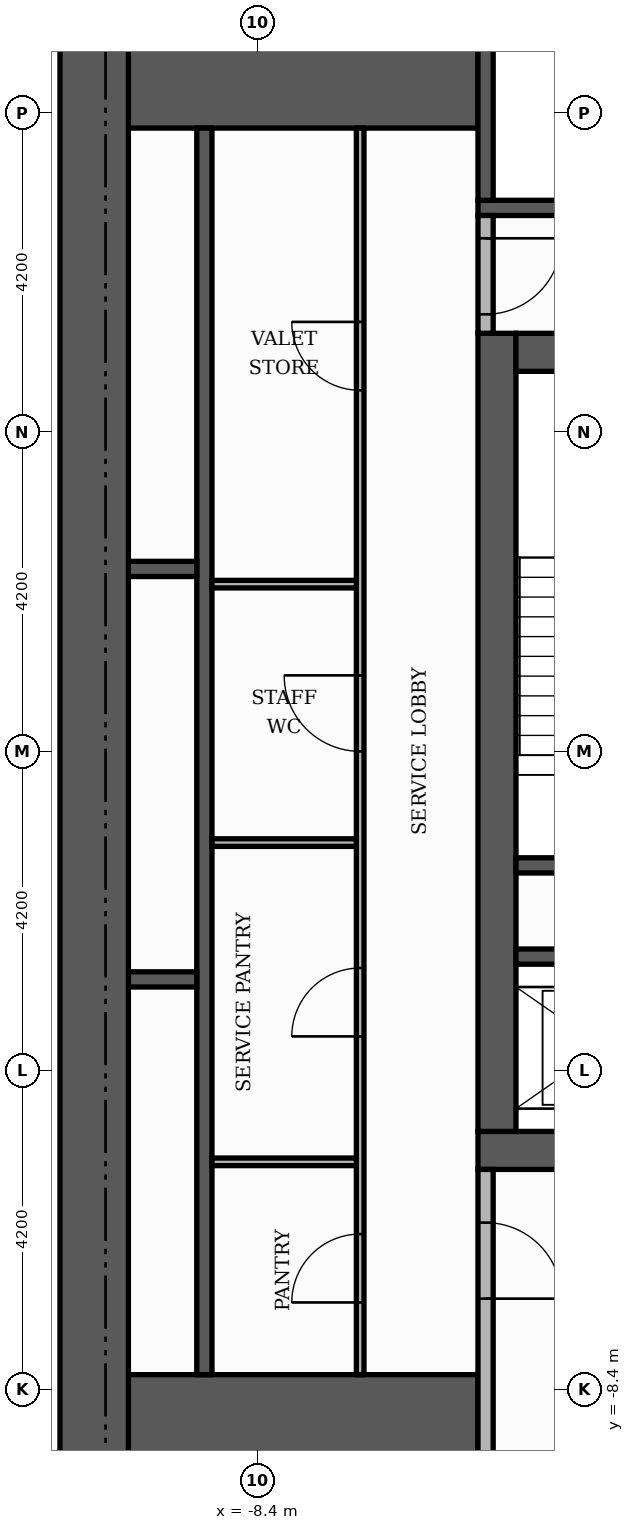
"""IFC4 building model, lengths in metres.
Left out: names, types, materials, properties, quantities, classifications, styles, units other than length and angle.
Written with IfcOpenShell. Run it as: python <this file> out.ifc"""

import sys

from ifc_helpers import new_model, si_unit, direction, frame, frame_2d, origin, place, context, subcontext, project, spatial, rectangle, extrude, element, fill, save


model = new_model("IFC4")
c1 = context("Model", 3, precision=1e-05, world=origin(), true_north=direction((0.0, 1.0)))
c2 = subcontext(c1, "Body", "Model", "MODEL_VIEW")
j1 = project(units=[si_unit("LENGTHUNIT", "METRE"), si_unit("PLANEANGLEUNIT", "RADIAN")], contexts=[c1])
p1 = place(None, origin())
s1 = spatial("IfcSite", under=j1, at=p1, CompositionType="ELEMENT")
p2 = place(p1, origin())
s2 = spatial("IfcBuilding", under=s1, at=p2, CompositionType="ELEMENT")
p3 = place(p2, frame((0.0, 0.0, 223.5)))
s3 = spatial("IfcBuildingStorey", under=s2, at=p3, CompositionType="ELEMENT", Elevation=223.5)
p4 = place(p3, frame((-5.5, -5.25, 0.0), z_axis=(0.0, 0.0, 1.0), x_axis=(1.0, 0.0, 0.0)))
e1 = element("IfcWall", 1, at=p4, inside=s3, PredefinedType="SHEAR", context=c2, shape_type="SweptSolid", body=[
    extrude(rectangle(XDim=11.0, YDim=0.5, at=frame_2d((5.5, 0.0))), origin(), (0.0, 0.0, 1.0), 3.48),
])
p5 = place(p4, frame((4.9, 0.0, 0.0)))
e2 = element("IfcOpeningElement", 2, at=p5, cuts=e1, PredefinedType="OPENING", context=c2, shape_type="SweptSolid", body=[
    extrude(rectangle(XDim=1.2, YDim=2.1, at=frame_2d((0.6, 1.05))), frame((0.0, 0.26, 0.0), z_axis=(0.0, -1.0, 0.0), x_axis=(1.0, 0.0, 0.0)), (0.0, 0.0, 1.0), 0.52),
])
p6 = place(p3, frame((-5.25, -5.0, 0.0), z_axis=(0.0, 0.0, 1.0), x_axis=(0.0, 1.0, 0.0)))
e3 = element("IfcWall", 3, at=p6, inside=s3, PredefinedType="SHEAR", context=c2, shape_type="SweptSolid", body=[
    extrude(rectangle(XDim=10.5, YDim=0.5, at=frame_2d((5.25, 0.0))), origin(), (0.0, 0.0, 1.0), 3.48),
])
p7 = place(p3, frame((-5.0, 5.25, 0.0), z_axis=(0.0, 0.0, 1.0), x_axis=(1.0, 0.0, 0.0)))
e4 = element("IfcWall", 4, at=p7, inside=s3, PredefinedType="SHEAR", context=c2, shape_type="SweptSolid", body=[
    extrude(rectangle(XDim=10.0, YDim=0.5, at=frame_2d((5.0, 0.0))), origin(), (0.0, 0.0, 1.0), 3.48),
])
p8 = place(p7, frame((4.4, 0.0, 0.0)))
e5 = element("IfcOpeningElement", 5, at=p8, cuts=e4, PredefinedType="OPENING", context=c2, shape_type="SweptSolid", body=[
    extrude(rectangle(XDim=1.2, YDim=2.1, at=frame_2d((0.6, 1.05))), frame((0.0, 0.26, 0.0), z_axis=(0.0, -1.0, 0.0), x_axis=(1.0, 0.0, 0.0)), (0.0, 0.0, 1.0), 0.52),
])
for number, where, z_axis, x_axis in (
    (6, (-10.1, -9.15, 0.0), (0.0, 0.0, 1.0), (1.0, 0.0, 0.0)),
    (7, (-10.1, 9.15, 0.0), (0.0, 0.0, 1.0), (1.0, 0.0, 0.0)),
):
    element("IfcWall", number, at=place(p3, frame(where, z_axis=z_axis, x_axis=x_axis)), inside=s3, PredefinedType="SHEAR", context=c2, shape_type="SweptSolid", body=[
        extrude(rectangle(XDim=4.6, YDim=1.9, at=frame_2d((2.3, 0.0))), origin(), (0.0, 0.0, 1.0), 3.48),
    ])
p9 = place(p3, frame((-5.0, -1.5, 0.0), z_axis=(0.0, 0.0, 1.0), x_axis=(1.0, 0.0, 0.0)))
e8 = element("IfcWall", 8, at=p9, inside=s3, PredefinedType="SHEAR", context=c2, shape_type="SweptSolid", body=[
    extrude(rectangle(XDim=3.05, YDim=0.2, at=frame_2d((1.525, 0.0))), origin(), (0.0, 0.0, 1.0), 3.48),
])
p10 = place(p3, frame((-5.5, 7.15, 0.0), z_axis=(0.0, 0.0, 1.0), x_axis=(1.0, 0.0, 0.0)))
e9 = element("IfcWall", 9, at=p10, inside=s3, PredefinedType="SHEAR", context=c2, shape_type="SweptSolid", body=[
    extrude(rectangle(XDim=6.8, YDim=0.2, at=frame_2d((3.4, 0.0))), origin(), (0.0, 0.0, 1.0), 3.48),
])
p11 = place(p3, frame((-5.4, 7.25, 0.0), z_axis=(0.0, 0.0, 1.0), x_axis=(0.0, 1.0, 0.0)))
e10 = element("IfcWall", 10, at=p11, inside=s3, PredefinedType="SHEAR", context=c2, shape_type="SweptSolid", body=[
    extrude(rectangle(XDim=2.85, YDim=0.2, at=frame_2d((1.425, 0.0))), origin(), (0.0, 0.0, 1.0), 3.48),
])
p12 = place(p3, frame((-9.1, -8.2, 0.0), z_axis=(0.0, 0.0, 1.0), x_axis=(0.0, 1.0, 0.0)))
e11 = element("IfcWall", 11, at=p12, inside=s3, PredefinedType="SHEAR", context=c2, shape_type="SweptSolid", body=[
    extrude(rectangle(XDim=16.4, YDim=0.2, at=frame_2d((8.2, 0.0))), origin(), (0.0, 0.0, 1.0), 3.48),
])
p13 = place(p3, frame((-10.1, -3.0, 0.0), z_axis=(0.0, 0.0, 1.0), x_axis=(1.0, 0.0, 0.0)))
e12 = element("IfcWall", 12, at=p13, inside=s3, PredefinedType="SHEAR", context=c2, shape_type="SweptSolid", body=[
    extrude(rectangle(XDim=0.9, YDim=0.2, at=frame_2d((0.45, 0.0))), origin(), (0.0, 0.0, 1.0), 3.48),
])
p14 = place(p3, frame((-5.0, -2.7, 0.0), z_axis=(0.0, 0.0, 1.0), x_axis=(1.0, 0.0, 0.0)))
e13 = element("IfcWall", 13, at=p14, inside=s3, PredefinedType="SHEAR", context=c2, shape_type="SweptSolid", body=[
    extrude(rectangle(XDim=2.85, YDim=0.2, at=frame_2d((1.425, 0.0))), origin(), (0.0, 0.0, 1.0), 3.48),
])
p15 = place(p3, frame((-10.1, 2.4, 0.0), z_axis=(0.0, 0.0, 1.0), x_axis=(1.0, 0.0, 0.0)))
e14 = element("IfcWall", 14, at=p15, inside=s3, PredefinedType="SHEAR", context=c2, shape_type="SweptSolid", body=[
    extrude(rectangle(XDim=0.9, YDim=0.2, at=frame_2d((0.45, 0.0))), origin(), (0.0, 0.0, 1.0), 3.48),
])
p16 = place(p3, frame((-10.55, -10.1, 0.0), z_axis=(0.0, 0.0, 1.0), x_axis=(0.0, 1.0, 0.0)))
e15 = element("IfcWall", 15, at=p16, inside=s3, PredefinedType="SHEAR", context=c2, shape_type="SweptSolid", body=[
    extrude(rectangle(XDim=20.2, YDim=0.9, at=frame_2d((10.1, 0.0))), origin(), (0.0, 0.0, 1.0), 3.48),
])
p17 = place(p3, frame((-5.4, -10.1, 0.0), z_axis=(0.0, 0.0, 1.0), x_axis=(0.0, 1.0, 0.0)))
e16 = element("IfcWall", 16, at=p17, inside=s3, PredefinedType="PARTITIONING", context=c2, shape_type="SweptSolid", body=[
    extrude(rectangle(XDim=4.6, YDim=0.2, at=frame_2d((2.3, 0.0))), origin(), (0.0, 0.0, 1.0), 3.48),
])
p18 = place(p17, frame((2.9, 0.0, 0.0)))
e17 = element("IfcOpeningElement", 17, at=p18, cuts=e16, PredefinedType="OPENING", context=c2, shape_type="SweptSolid", body=[
    extrude(rectangle(XDim=1.0, YDim=2.1, at=frame_2d((0.5, 1.05))), frame((0.0, 0.11, 0.0), z_axis=(0.0, -1.0, 0.0), x_axis=(1.0, 0.0, 0.0)), (0.0, 0.0, 1.0), 0.22),
])
p19 = place(p3, frame((-7.05, -8.2, 0.0), z_axis=(0.0, 0.0, 1.0), x_axis=(0.0, 1.0, 0.0)))
e18 = element("IfcWall", 18, at=p19, inside=s3, PredefinedType="PARTITIONING", context=c2, shape_type="SweptSolid", body=[
    extrude(rectangle(XDim=16.4, YDim=0.1, at=frame_2d((8.2, 0.0))), origin(), (0.0, 0.0, 1.0), 3.48),
])
p20 = place(p19, frame((0.95, 0.0, 0.0)))
e19 = element("IfcOpeningElement", 19, at=p20, cuts=e18, PredefinedType="OPENING", context=c2, shape_type="SweptSolid", body=[
    extrude(rectangle(XDim=0.9, YDim=2.1, at=frame_2d((0.45, 1.05))), frame((0.0, 0.06, 0.0), z_axis=(0.0, -1.0, 0.0), x_axis=(1.0, 0.0, 0.0)), (0.0, 0.0, 1.0), 0.12),
])
p21 = place(p19, frame((4.45, 0.0, 0.0)))
e20 = element("IfcOpeningElement", 20, at=p21, cuts=e18, PredefinedType="OPENING", context=c2, shape_type="SweptSolid", body=[
    extrude(rectangle(XDim=0.9, YDim=2.1, at=frame_2d((0.45, 1.05))), frame((0.0, 0.06, 0.0), z_axis=(0.0, -1.0, 0.0), x_axis=(1.0, 0.0, 0.0)), (0.0, 0.0, 1.0), 0.12),
])
p22 = place(p19, frame((8.2, 0.0, 0.0)))
e21 = element("IfcOpeningElement", 21, at=p22, cuts=e18, PredefinedType="OPENING", context=c2, shape_type="SweptSolid", body=[
    extrude(rectangle(XDim=1.0, YDim=2.1, at=frame_2d((0.5, 1.05))), frame((0.0, 0.06, 0.0), z_axis=(0.0, -1.0, 0.0), x_axis=(1.0, 0.0, 0.0)), (0.0, 0.0, 1.0), 0.12),
])
p23 = place(p19, frame((12.95, 0.0, 0.0)))
e22 = element("IfcOpeningElement", 22, at=p23, cuts=e18, PredefinedType="OPENING", context=c2, shape_type="SweptSolid", body=[
    extrude(rectangle(XDim=0.9, YDim=2.1, at=frame_2d((0.45, 1.05))), frame((0.0, 0.06, 0.0), z_axis=(0.0, -1.0, 0.0), x_axis=(1.0, 0.0, 0.0)), (0.0, 0.0, 1.0), 0.12),
])
for number, where, z_axis, x_axis in (
    (23, (-9.0, -5.4, 0.0), (0.0, 0.0, 1.0), (1.0, 0.0, 0.0)),
    (24, (-9.0, -1.2, 0.0), (0.0, 0.0, 1.0), (1.0, 0.0, 0.0)),
    (25, (-9.0, 2.2, 0.0), (0.0, 0.0, 1.0), (1.0, 0.0, 0.0)),
):
    element("IfcWall", number, at=place(p3, frame(where, z_axis=z_axis, x_axis=x_axis)), inside=s3, PredefinedType="PARTITIONING", context=c2, shape_type="SweptSolid", body=[
        extrude(rectangle(XDim=1.9, YDim=0.1, at=frame_2d((0.95, 0.0))), origin(), (0.0, 0.0, 1.0), 3.48),
    ])
p24 = place(p3, frame((-5.4, 5.5, 0.0), z_axis=(0.0, 0.0, 1.0), x_axis=(0.0, 1.0, 0.0)))
e26 = element("IfcWall", 26, at=p24, inside=s3, PredefinedType="PARTITIONING", context=c2, shape_type="SweptSolid", body=[
    extrude(rectangle(XDim=1.55, YDim=0.2, at=frame_2d((0.775, 0.0))), origin(), (0.0, 0.0, 1.0), 3.48),
])
p25 = place(p24, frame((0.25, 0.0, 0.0)))
e27 = element("IfcOpeningElement", 27, at=p25, cuts=e26, PredefinedType="OPENING", context=c2, shape_type="SweptSolid", body=[
    extrude(rectangle(XDim=1.0, YDim=2.1, at=frame_2d((0.5, 1.05))), frame((0.0, 0.11, 0.0), z_axis=(0.0, -1.0, 0.0), x_axis=(1.0, 0.0, 0.0)), (0.0, 0.0, 1.0), 0.22),
])
p26 = place(p25, frame((1.0, 0.0, 0.0), z_axis=(0.0, 0.0, 1.0), x_axis=(-1.0, 0.0, 0.0)))
e28 = element("IfcDoor", 28, at=p26, inside=s3, OperationType="SINGLE_SWING_RIGHT", PredefinedType="DOOR", context=c2, shape_type="SweptSolid", body=[
    extrude(rectangle(XDim=1.0, YDim=2.1, at=frame_2d((0.5, 1.05))), frame((0.0, 0.025, 0.0), z_axis=(0.0, -1.0, 0.0), x_axis=(1.0, 0.0, 0.0)), (0.0, 0.0, 1.0), 0.05),
])
fill(e27, e28)
p27 = place(p18, frame((1.0, 0.0, 0.0), z_axis=(0.0, 0.0, 1.0), x_axis=(-1.0, 0.0, 0.0)))
e29 = element("IfcDoor", 29, at=p27, inside=s3, OperationType="SINGLE_SWING_LEFT", PredefinedType="DOOR", context=c2, shape_type="SweptSolid", body=[
    extrude(rectangle(XDim=1.0, YDim=2.1, at=frame_2d((0.5, 1.05))), frame((0.0, 0.025, 0.0), z_axis=(0.0, -1.0, 0.0), x_axis=(1.0, 0.0, 0.0)), (0.0, 0.0, 1.0), 0.05),
])
fill(e17, e29)
p28 = place(p20, origin())
e30 = element("IfcDoor", 30, at=p28, inside=s3, OperationType="SINGLE_SWING_LEFT", PredefinedType="DOOR", context=c2, shape_type="SweptSolid", body=[
    extrude(rectangle(XDim=0.9, YDim=2.1, at=frame_2d((0.45, 1.05))), frame((0.0, 0.025, 0.0), z_axis=(0.0, -1.0, 0.0), x_axis=(1.0, 0.0, 0.0)), (0.0, 0.0, 1.0), 0.05),
])
fill(e19, e30)
p29 = place(p21, origin())
e31 = element("IfcDoor", 31, at=p29, inside=s3, OperationType="SINGLE_SWING_LEFT", PredefinedType="DOOR", context=c2, shape_type="SweptSolid", body=[
    extrude(rectangle(XDim=0.9, YDim=2.1, at=frame_2d((0.45, 1.05))), frame((0.0, 0.025, 0.0), z_axis=(0.0, -1.0, 0.0), x_axis=(1.0, 0.0, 0.0)), (0.0, 0.0, 1.0), 0.05),
])
fill(e20, e31)
p30 = place(p22, origin())
e32 = element("IfcDoor", 32, at=p30, inside=s3, OperationType="SINGLE_SWING_RIGHT", PredefinedType="DOOR", context=c2, shape_type="SweptSolid", body=[
    extrude(rectangle(XDim=1.0, YDim=2.1, at=frame_2d((0.5, 1.05))), frame((0.0, 0.025, 0.0), z_axis=(0.0, -1.0, 0.0), x_axis=(1.0, 0.0, 0.0)), (0.0, 0.0, 1.0), 0.05),
])
fill(e21, e32)
p31 = place(p23, origin())
e33 = element("IfcDoor", 33, at=p31, inside=s3, OperationType="SINGLE_SWING_RIGHT", PredefinedType="DOOR", context=c2, shape_type="SweptSolid", body=[
    extrude(rectangle(XDim=0.9, YDim=2.1, at=frame_2d((0.45, 1.05))), frame((0.0, 0.025, 0.0), z_axis=(0.0, -1.0, 0.0), x_axis=(1.0, 0.0, 0.0)), (0.0, 0.0, 1.0), 0.05),
])
fill(e22, e33)
save(model, sys.argv[1])
